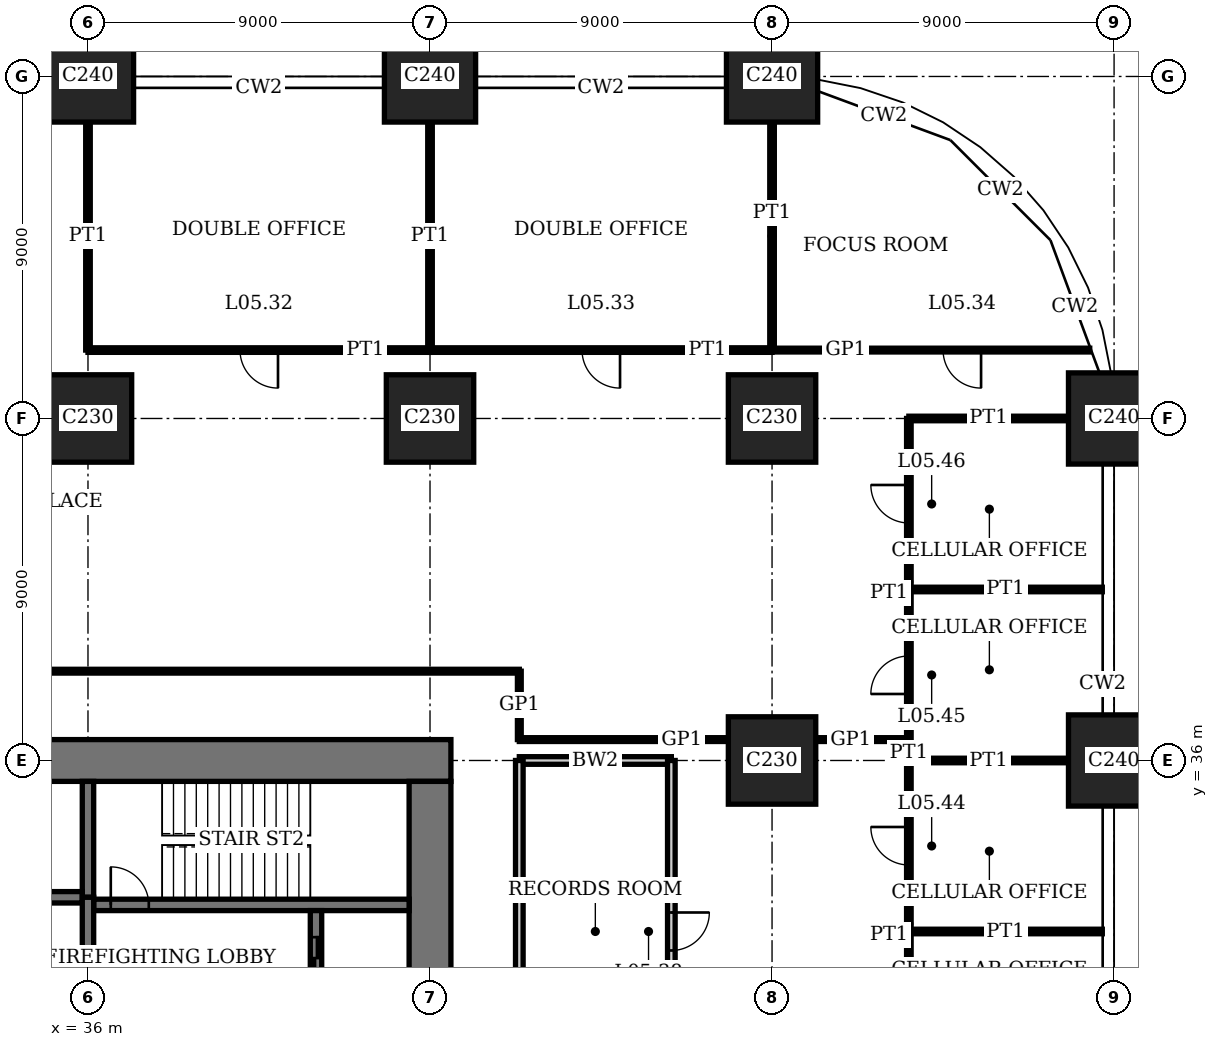
"""IFC4 building model, lengths in metres.
Left out: names, types, materials, properties, quantities, classifications, styles, units other than length and angle.
Written with IfcOpenShell. Run it as: python <this file> out.ifc"""

import sys

from ifc_helpers import new_model, si_unit, direction, frame, frame_2d, origin, origin_2d, place, context, subcontext, project, spatial, rectangle, extrude, element, fill, save


model = new_model("IFC4")
c1 = context("Model", 3, precision=1e-05, world=origin(), true_north=direction((0.0, 1.0)))
c2 = subcontext(c1, "Body", "Model", "MODEL_VIEW")
j1 = project(units=[si_unit("LENGTHUNIT", "METRE"), si_unit("PLANEANGLEUNIT", "RADIAN")], contexts=[c1])
p1 = place(None, origin())
s1 = spatial("IfcSite", under=j1, at=p1, CompositionType="ELEMENT")
p2 = place(p1, origin())
s2 = spatial("IfcBuilding", under=s1, at=p2, CompositionType="ELEMENT")
p3 = place(p2, frame((0.0, 0.0, 23.8)))
s3 = spatial("IfcBuildingStorey", under=s2, at=p3, CompositionType="ELEMENT", Elevation=23.8)
p4 = place(p3, frame((36.0, 45.0, 0.0), z_axis=(0.0, 0.0, 1.0), x_axis=(1.0, 0.0, 0.0)))
e1 = element("IfcColumn", 1, at=p4, inside=s3, PredefinedType="COLUMN", context=c2, shape_type="SweptSolid", body=[
    extrude(rectangle(XDim=2.3, YDim=2.3, at=origin_2d()), origin(), (0.0, 0.0, 1.0), 4.0),
])
p5 = place(p3, frame((36.0, 54.0, 0.0), z_axis=(0.0, 0.0, 1.0), x_axis=(1.0, 0.0, 0.0)))
e2 = element("IfcColumn", 2, at=p5, inside=s3, PredefinedType="COLUMN", context=c2, shape_type="SweptSolid", body=[
    extrude(rectangle(XDim=2.4, YDim=2.4, at=origin_2d()), origin(), (0.0, 0.0, 1.0), 4.0),
])
p6 = place(p3, frame((45.0, 45.0, 0.0), z_axis=(0.0, 0.0, 1.0), x_axis=(1.0, 0.0, 0.0)))
e3 = element("IfcColumn", 3, at=p6, inside=s3, PredefinedType="COLUMN", context=c2, shape_type="SweptSolid", body=[
    extrude(rectangle(XDim=2.3, YDim=2.3, at=origin_2d()), origin(), (0.0, 0.0, 1.0), 4.0),
])
p7 = place(p3, frame((45.0, 54.0, 0.0), z_axis=(0.0, 0.0, 1.0), x_axis=(1.0, 0.0, 0.0)))
e4 = element("IfcColumn", 4, at=p7, inside=s3, PredefinedType="COLUMN", context=c2, shape_type="SweptSolid", body=[
    extrude(rectangle(XDim=2.4, YDim=2.4, at=origin_2d()), origin(), (0.0, 0.0, 1.0), 4.0),
])
for number, where, z_axis, x_axis in (
    (5, (54.0, 36.0, 0.0), (0.0, 0.0, 1.0), (1.0, 0.0, 0.0)),
    (6, (54.0, 45.0, 0.0), (0.0, 0.0, 1.0), (1.0, 0.0, 0.0)),
):
    element("IfcColumn", number, at=place(p3, frame(where, z_axis=z_axis, x_axis=x_axis)), inside=s3, PredefinedType="COLUMN", context=c2, shape_type="SweptSolid", body=[
        extrude(rectangle(XDim=2.3, YDim=2.3, at=origin_2d()), origin(), (0.0, 0.0, 1.0), 4.0),
    ])
for number, where, z_axis, x_axis in (
    (7, (54.0, 54.0, 0.0), (0.0, 0.0, 1.0), (1.0, 0.0, 0.0)),
    (8, (63.0, 36.0, 0.0), (0.0, 0.0, 1.0), (1.0, 0.0, 0.0)),
    (9, (63.0, 45.0, 0.0), (0.0, 0.0, 1.0), (1.0, 0.0, 0.0)),
):
    element("IfcColumn", number, at=place(p3, frame(where, z_axis=z_axis, x_axis=x_axis)), inside=s3, PredefinedType="COLUMN", context=c2, shape_type="SweptSolid", body=[
        extrude(rectangle(XDim=2.4, YDim=2.4, at=origin_2d()), origin(), (0.0, 0.0, 1.0), 4.0),
    ])
p8 = place(p3, frame((45.55, 36.0, 0.0), z_axis=(0.0, 0.0, 1.0), x_axis=(-1.0, 0.0, 0.0)))
e10 = element("IfcWall", 10, at=p8, inside=s3, PredefinedType="SHEAR", context=c2, shape_type="SweptSolid", body=[
    extrude(rectangle(XDim=28.1, YDim=1.1, at=frame_2d((14.05, 0.0))), origin(), (0.0, 0.0, 1.0), 4.0),
])
p9 = place(p8, frame((11.55, 0.0, 0.0)))
e11 = element("IfcOpeningElement", 11, at=p9, cuts=e10, PredefinedType="OPENING", context=c2, shape_type="SweptSolid", body=[
    extrude(rectangle(XDim=1.0, YDim=2.4, at=frame_2d((0.5, 1.2))), frame((0.0, 0.56, 0.0), z_axis=(0.0, -1.0, 0.0), x_axis=(1.0, 0.0, 0.0)), (0.0, 0.0, 1.0), 1.12),
])
p10 = place(p8, frame((16.55, 0.0, 0.0)))
e12 = element("IfcOpeningElement", 12, at=p10, cuts=e10, PredefinedType="OPENING", context=c2, shape_type="SweptSolid", body=[
    extrude(rectangle(XDim=1.0, YDim=2.4, at=frame_2d((0.5, 1.2))), frame((0.0, 0.56, 0.0), z_axis=(0.0, -1.0, 0.0), x_axis=(1.0, 0.0, 0.0)), (0.0, 0.0, 1.0), 1.12),
])
p11 = place(p8, frame((20.0, 0.0, 0.0)))
e13 = element("IfcOpeningElement", 13, at=p11, cuts=e10, PredefinedType="OPENING", context=c2, shape_type="SweptSolid", body=[
    extrude(rectangle(XDim=1.1, YDim=2.4, at=frame_2d((0.55, 1.2))), frame((0.0, 0.56, 0.0), z_axis=(0.0, -1.0, 0.0), x_axis=(1.0, 0.0, 0.0)), (0.0, 0.0, 1.0), 1.12),
])
p12 = place(p8, frame((24.05, 0.0, 0.0)))
e14 = element("IfcOpeningElement", 14, at=p12, cuts=e10, PredefinedType="OPENING", context=c2, shape_type="SweptSolid", body=[
    extrude(rectangle(XDim=1.0, YDim=2.4, at=frame_2d((0.5, 1.2))), frame((0.0, 0.56, 0.0), z_axis=(0.0, -1.0, 0.0), x_axis=(1.0, 0.0, 0.0)), (0.0, 0.0, 1.0), 1.12),
])
p13 = place(p3, frame((45.0, 18.55, 0.0), z_axis=(0.0, 0.0, 1.0), x_axis=(0.0, 1.0, 0.0)))
e15 = element("IfcWall", 15, at=p13, inside=s3, PredefinedType="SHEAR", context=c2, shape_type="SweptSolid", body=[
    extrude(rectangle(XDim=16.9, YDim=1.1, at=frame_2d((8.45, 0.0))), origin(), (0.0, 0.0, 1.0), 4.0),
])
p14 = place(p13, frame((8.45, 0.0, 0.0)))
e16 = element("IfcOpeningElement", 16, at=p14, cuts=e15, PredefinedType="OPENING", context=c2, shape_type="SweptSolid", body=[
    extrude(rectangle(XDim=1.8, YDim=2.4, at=frame_2d((0.9, 1.2))), frame((0.0, 0.56, 0.0), z_axis=(0.0, -1.0, 0.0), x_axis=(1.0, 0.0, 0.0)), (0.0, 0.0, 1.0), 1.12),
])
p15 = place(p3, frame((36.15, 32.2, 0.0), z_axis=(0.0, 0.0, 1.0), x_axis=(1.0, 0.0, 0.0)))
e17 = element("IfcWall", 17, at=p15, inside=s3, PredefinedType="SHEAR", context=c2, shape_type="SweptSolid", body=[
    extrude(rectangle(XDim=8.3, YDim=0.3, at=frame_2d((4.15, 0.0))), origin(), (0.0, 0.0, 1.0), 4.0),
])
p16 = place(p15, frame((0.45, 0.0, 0.0)))
e18 = element("IfcOpeningElement", 18, at=p16, cuts=e17, PredefinedType="OPENING", context=c2, shape_type="SweptSolid", body=[
    extrude(rectangle(XDim=1.0, YDim=2.4, at=frame_2d((0.5, 1.2))), frame((0.0, 0.16, 0.0), z_axis=(0.0, -1.0, 0.0), x_axis=(1.0, 0.0, 0.0)), (0.0, 0.0, 1.0), 0.32),
])
p17 = place(p3, frame((36.0, 32.4, 0.0), z_axis=(0.0, 0.0, 1.0), x_axis=(0.0, 1.0, 0.0)))
e19 = element("IfcWall", 19, at=p17, inside=s3, PredefinedType="SHEAR", context=c2, shape_type="SweptSolid", body=[
    extrude(rectangle(XDim=3.05, YDim=0.3, at=frame_2d((1.525, 0.0))), origin(), (0.0, 0.0, 1.0), 4.0),
])
p18 = place(p3, frame((42.0, 29.55, 0.0), z_axis=(0.0, 0.0, 1.0), x_axis=(0.0, 1.0, 0.0)))
e20 = element("IfcWall", 20, at=p18, inside=s3, PredefinedType="SHEAR", context=c2, shape_type="SweptSolid", body=[
    extrude(rectangle(XDim=2.5, YDim=0.3, at=frame_2d((1.25, 0.0))), origin(), (0.0, 0.0, 1.0), 4.0),
])
p19 = place(p18, frame((0.7, 0.0, 0.0)))
e21 = element("IfcOpeningElement", 21, at=p19, cuts=e20, PredefinedType="OPENING", context=c2, shape_type="SweptSolid", body=[
    extrude(rectangle(XDim=1.1, YDim=2.4, at=frame_2d((0.55, 1.2))), frame((0.0, 0.16, 0.0), z_axis=(0.0, -1.0, 0.0), x_axis=(1.0, 0.0, 0.0)), (0.0, 0.0, 1.0), 0.32),
])
p20 = place(p3, frame((18.55, 32.4, 0.0), z_axis=(0.0, 0.0, 1.0), x_axis=(1.0, 0.0, 0.0)))
e22 = element("IfcWall", 22, at=p20, inside=s3, PredefinedType="SHEAR", context=c2, shape_type="SweptSolid", body=[
    extrude(rectangle(XDim=17.3, YDim=0.3, at=frame_2d((8.65, 0.0))), origin(), (0.0, 0.0, 1.0), 4.0),
])
p21 = place(p3, frame((36.0, 29.55, 0.0), z_axis=(0.0, 0.0, 1.0), x_axis=(0.0, 1.0, 0.0)))
e23 = element("IfcWall", 23, at=p21, inside=s3, PredefinedType="SHEAR", context=c2, shape_type="SweptSolid", body=[
    extrude(rectangle(XDim=2.85, YDim=0.3, at=frame_2d((1.425, 0.0))), origin(), (0.0, 0.0, 1.0), 4.0),
])
p22 = place(p3, frame((57.6, 31.5, 0.0), z_axis=(0.0, 0.0, 1.0), x_axis=(1.0, 0.0, 0.0)))
e24 = element("IfcWall", 24, at=p22, inside=s3, PredefinedType="PARTITIONING", context=c2, shape_type="SweptSolid", body=[
    extrude(rectangle(XDim=5.09, YDim=0.12, at=frame_2d((2.545, 0.0))), origin(), (0.0, 0.0, 1.0), 3.1),
])
p23 = place(p3, frame((47.35, 36.0, 0.0), z_axis=(0.0, 0.0, 1.0), x_axis=(1.0, 0.0, 0.0)))
e25 = element("IfcWall", 25, at=p23, inside=s3, PredefinedType="SOLIDWALL", context=c2, shape_type="SweptSolid", body=[
    extrude(rectangle(XDim=4.0, YDim=0.2, at=frame_2d((2.0, 0.0))), origin(), (0.0, 0.0, 1.0), 3.05),
])
p24 = place(p3, frame((57.6, 36.0, 0.0), z_axis=(0.0, 0.0, 1.0), x_axis=(1.0, 0.0, 0.0)))
e26 = element("IfcWall", 26, at=p24, inside=s3, PredefinedType="PARTITIONING", context=c2, shape_type="SweptSolid", body=[
    extrude(rectangle(XDim=4.2, YDim=0.12, at=frame_2d((2.1, 0.0))), origin(), (0.0, 0.0, 1.0), 3.05),
])
p25 = place(p3, frame((47.35, 36.55, 0.0), z_axis=(0.0, 0.0, 1.0), x_axis=(1.0, 0.0, 0.0)))
e27 = element("IfcWall", 27, at=p25, inside=s3, PredefinedType="PARTITIONING", context=c2, shape_type="SweptSolid", body=[
    extrude(rectangle(XDim=5.5, YDim=0.1, at=frame_2d((2.75, 0.0))), origin(), (0.0, 0.0, 1.0), 3.75),
])
p26 = place(p3, frame((55.15, 36.55, 0.0), z_axis=(0.0, 0.0, 1.0), x_axis=(1.0, 0.0, 0.0)))
e28 = element("IfcWall", 28, at=p26, inside=s3, PredefinedType="PARTITIONING", context=c2, shape_type="SweptSolid", body=[
    extrude(rectangle(XDim=2.46, YDim=0.1, at=frame_2d((1.23, 0.0))), origin(), (0.0, 0.0, 1.0), 3.75),
])
p27 = place(p3, frame((15.65, 38.35, 0.0), z_axis=(0.0, 0.0, 1.0), x_axis=(1.0, 0.0, 0.0)))
e29 = element("IfcWall", 29, at=p27, inside=s3, PredefinedType="PARTITIONING", context=c2, shape_type="SweptSolid", body=[
    extrude(rectangle(XDim=31.7, YDim=0.1, at=frame_2d((15.85, 0.0))), origin(), (0.0, 0.0, 1.0), 3.75),
])
p28 = place(p27, frame((15.35, 0.0, 0.0)))
e30 = element("IfcOpeningElement", 30, at=p28, cuts=e29, PredefinedType="OPENING", context=c2, shape_type="SweptSolid", body=[
    extrude(rectangle(XDim=1.0, YDim=2.4, at=frame_2d((0.5, 1.2))), frame((0.0, 0.06, 0.0), z_axis=(0.0, -1.0, 0.0), x_axis=(1.0, 0.0, 0.0)), (0.0, 0.0, 1.0), 0.12),
])
p29 = place(p3, frame((57.6, 40.5, 0.0), z_axis=(0.0, 0.0, 1.0), x_axis=(1.0, 0.0, 0.0)))
e31 = element("IfcWall", 31, at=p29, inside=s3, PredefinedType="PARTITIONING", context=c2, shape_type="SweptSolid", body=[
    extrude(rectangle(XDim=5.09, YDim=0.12, at=frame_2d((2.545, 0.0))), origin(), (0.0, 0.0, 1.0), 3.1),
])
p30 = place(p3, frame((57.6, 45.0, 0.0), z_axis=(0.0, 0.0, 1.0), x_axis=(1.0, 0.0, 0.0)))
e32 = element("IfcWall", 32, at=p30, inside=s3, PredefinedType="PARTITIONING", context=c2, shape_type="SweptSolid", body=[
    extrude(rectangle(XDim=4.2, YDim=0.12, at=frame_2d((2.1, 0.0))), origin(), (0.0, 0.0, 1.0), 3.05),
])
p31 = place(p3, frame((36.0, 46.8, 0.0), z_axis=(0.0, 0.0, 1.0), x_axis=(1.0, 0.0, 0.0)))
e33 = element("IfcWall", 33, at=p31, inside=s3, PredefinedType="PARTITIONING", context=c2, shape_type="SweptSolid", body=[
    extrude(rectangle(XDim=9.0, YDim=0.12, at=frame_2d((4.5, 0.0))), origin(), (0.0, 0.0, 1.0), 3.75),
])
p32 = place(p31, frame((4.0, 0.0, 0.0)))
e34 = element("IfcOpeningElement", 34, at=p32, cuts=e33, PredefinedType="OPENING", context=c2, shape_type="SweptSolid", body=[
    extrude(rectangle(XDim=1.0, YDim=2.4, at=frame_2d((0.5, 1.2))), frame((0.0, 0.07, 0.0), z_axis=(0.0, -1.0, 0.0), x_axis=(1.0, 0.0, 0.0)), (0.0, 0.0, 1.0), 0.14),
])
p33 = place(p3, frame((45.0, 46.8, 0.0), z_axis=(0.0, 0.0, 1.0), x_axis=(1.0, 0.0, 0.0)))
e35 = element("IfcWall", 35, at=p33, inside=s3, PredefinedType="PARTITIONING", context=c2, shape_type="SweptSolid", body=[
    extrude(rectangle(XDim=9.0, YDim=0.12, at=frame_2d((4.5, 0.0))), origin(), (0.0, 0.0, 1.0), 3.75),
])
p34 = place(p33, frame((4.0, 0.0, 0.0)))
e36 = element("IfcOpeningElement", 36, at=p34, cuts=e35, PredefinedType="OPENING", context=c2, shape_type="SweptSolid", body=[
    extrude(rectangle(XDim=1.0, YDim=2.4, at=frame_2d((0.5, 1.2))), frame((0.0, 0.07, 0.0), z_axis=(0.0, -1.0, 0.0), x_axis=(1.0, 0.0, 0.0)), (0.0, 0.0, 1.0), 0.14),
])
p35 = place(p3, frame((54.0, 46.8, 0.0), z_axis=(0.0, 0.0, 1.0), x_axis=(1.0, 0.0, 0.0)))
e37 = element("IfcWall", 37, at=p35, inside=s3, PredefinedType="PARTITIONING", context=c2, shape_type="SweptSolid", body=[
    extrude(rectangle(XDim=8.359, YDim=0.1, at=frame_2d((4.18, 0.0))), origin(), (0.0, 0.0, 1.0), 3.75),
])
p36 = place(p35, frame((4.5, 0.0, 0.0)))
e38 = element("IfcOpeningElement", 38, at=p36, cuts=e37, PredefinedType="OPENING", context=c2, shape_type="SweptSolid", body=[
    extrude(rectangle(XDim=1.0, YDim=2.4, at=frame_2d((0.5, 1.2))), frame((0.0, 0.06, 0.0), z_axis=(0.0, -1.0, 0.0), x_axis=(1.0, 0.0, 0.0)), (0.0, 0.0, 1.0), 0.12),
])
for number, where, z_axis, x_axis in (
    (39, (36.0, 46.8, 0.0), (0.0, 0.0, 1.0), (0.0, 1.0, 0.0)),
    (40, (45.0, 46.8, 0.0), (0.0, 0.0, 1.0), (0.0, 1.0, 0.0)),
):
    element("IfcWall", number, at=place(p3, frame(where, z_axis=z_axis, x_axis=x_axis)), inside=s3, PredefinedType="PARTITIONING", context=c2, shape_type="SweptSolid", body=[
        extrude(rectangle(XDim=6.0, YDim=0.12, at=frame_2d((3.0, 0.0))), origin(), (0.0, 0.0, 1.0), 3.05),
    ])
p37 = place(p3, frame((47.35, 27.0, 0.0), z_axis=(0.0, 0.0, 1.0), x_axis=(0.0, 1.0, 0.0)))
e41 = element("IfcWall", 41, at=p37, inside=s3, PredefinedType="SOLIDWALL", context=c2, shape_type="SweptSolid", body=[
    extrude(rectangle(XDim=9.0, YDim=0.2, at=frame_2d((4.5, 0.0))), origin(), (0.0, 0.0, 1.0), 3.75),
])
p38 = place(p3, frame((47.35, 36.55, 0.0), z_axis=(0.0, 0.0, 1.0), x_axis=(0.0, 1.0, 0.0)))
e42 = element("IfcWall", 42, at=p38, inside=s3, PredefinedType="PARTITIONING", context=c2, shape_type="SweptSolid", body=[
    extrude(rectangle(XDim=1.8, YDim=0.1, at=frame_2d((0.9, 0.0))), origin(), (0.0, 0.0, 1.0), 3.75),
])
p39 = place(p3, frame((51.35, 27.0, 0.0), z_axis=(0.0, 0.0, 1.0), x_axis=(0.0, 1.0, 0.0)))
e43 = element("IfcWall", 43, at=p39, inside=s3, PredefinedType="SOLIDWALL", context=c2, shape_type="SweptSolid", body=[
    extrude(rectangle(XDim=9.0, YDim=0.2, at=frame_2d((4.5, 0.0))), origin(), (0.0, 0.0, 1.0), 3.75),
])
p40 = place(p39, frame((4.0, 0.0, 0.0)))
e44 = element("IfcOpeningElement", 44, at=p40, cuts=e43, PredefinedType="OPENING", context=c2, shape_type="SweptSolid", body=[
    extrude(rectangle(XDim=1.0, YDim=2.4, at=frame_2d((0.5, 1.2))), frame((0.0, 0.11, 0.0), z_axis=(0.0, -1.0, 0.0), x_axis=(1.0, 0.0, 0.0)), (0.0, 0.0, 1.0), 0.22),
])
p41 = place(p3, frame((54.0, 46.8, 0.0), z_axis=(0.0, 0.0, 1.0), x_axis=(0.0, 1.0, 0.0)))
e45 = element("IfcWall", 45, at=p41, inside=s3, PredefinedType="PARTITIONING", context=c2, shape_type="SweptSolid", body=[
    extrude(rectangle(XDim=6.0, YDim=0.12, at=frame_2d((3.0, 0.0))), origin(), (0.0, 0.0, 1.0), 3.05),
])
p42 = place(p3, frame((57.6, 27.0, 0.0), z_axis=(0.0, 0.0, 1.0), x_axis=(0.0, 1.0, 0.0)))
e46 = element("IfcWall", 46, at=p42, inside=s3, PredefinedType="PARTITIONING", context=c2, shape_type="SweptSolid", body=[
    extrude(rectangle(XDim=4.5, YDim=0.12, at=frame_2d((2.25, 0.0))), origin(), (0.0, 0.0, 1.0), 3.75),
])
p43 = place(p42, frame((1.75, 0.0, 0.0)))
e47 = element("IfcOpeningElement", 47, at=p43, cuts=e46, PredefinedType="OPENING", context=c2, shape_type="SweptSolid", body=[
    extrude(rectangle(XDim=1.0, YDim=2.4, at=frame_2d((0.5, 1.2))), frame((0.0, 0.07, 0.0), z_axis=(0.0, -1.0, 0.0), x_axis=(1.0, 0.0, 0.0)), (0.0, 0.0, 1.0), 0.14),
])
p44 = place(p3, frame((57.6, 31.5, 0.0), z_axis=(0.0, 0.0, 1.0), x_axis=(0.0, 1.0, 0.0)))
e48 = element("IfcWall", 48, at=p44, inside=s3, PredefinedType="PARTITIONING", context=c2, shape_type="SweptSolid", body=[
    extrude(rectangle(XDim=4.5, YDim=0.12, at=frame_2d((2.25, 0.0))), origin(), (0.0, 0.0, 1.0), 3.75),
])
p45 = place(p44, frame((1.75, 0.0, 0.0)))
e49 = element("IfcOpeningElement", 49, at=p45, cuts=e48, PredefinedType="OPENING", context=c2, shape_type="SweptSolid", body=[
    extrude(rectangle(XDim=1.0, YDim=2.4, at=frame_2d((0.5, 1.2))), frame((0.0, 0.07, 0.0), z_axis=(0.0, -1.0, 0.0), x_axis=(1.0, 0.0, 0.0)), (0.0, 0.0, 1.0), 0.14),
])
p46 = place(p3, frame((57.6, 36.0, 0.0), z_axis=(0.0, 0.0, 1.0), x_axis=(0.0, 1.0, 0.0)))
e50 = element("IfcWall", 50, at=p46, inside=s3, PredefinedType="PARTITIONING", context=c2, shape_type="SweptSolid", body=[
    extrude(rectangle(XDim=4.5, YDim=0.12, at=frame_2d((2.25, 0.0))), origin(), (0.0, 0.0, 1.0), 3.75),
])
p47 = place(p46, frame((1.75, 0.0, 0.0)))
e51 = element("IfcOpeningElement", 51, at=p47, cuts=e50, PredefinedType="OPENING", context=c2, shape_type="SweptSolid", body=[
    extrude(rectangle(XDim=1.0, YDim=2.4, at=frame_2d((0.5, 1.2))), frame((0.0, 0.07, 0.0), z_axis=(0.0, -1.0, 0.0), x_axis=(1.0, 0.0, 0.0)), (0.0, 0.0, 1.0), 0.14),
])
p48 = place(p3, frame((57.6, 40.5, 0.0), z_axis=(0.0, 0.0, 1.0), x_axis=(0.0, 1.0, 0.0)))
e52 = element("IfcWall", 52, at=p48, inside=s3, PredefinedType="PARTITIONING", context=c2, shape_type="SweptSolid", body=[
    extrude(rectangle(XDim=4.5, YDim=0.12, at=frame_2d((2.25, 0.0))), origin(), (0.0, 0.0, 1.0), 3.75),
])
p49 = place(p48, frame((1.75, 0.0, 0.0)))
e53 = element("IfcOpeningElement", 53, at=p49, cuts=e52, PredefinedType="OPENING", context=c2, shape_type="SweptSolid", body=[
    extrude(rectangle(XDim=1.0, YDim=2.4, at=frame_2d((0.5, 1.2))), frame((0.0, 0.07, 0.0), z_axis=(0.0, -1.0, 0.0), x_axis=(1.0, 0.0, 0.0)), (0.0, 0.0, 1.0), 0.14),
])
p50 = place(p16, origin())
e54 = element("IfcDoor", 54, at=p50, inside=s3, OperationType="SINGLE_SWING_RIGHT", PredefinedType="DOOR", context=c2, shape_type="SweptSolid", body=[
    extrude(rectangle(XDim=1.0, YDim=2.4, at=frame_2d((0.5, 1.2))), frame((0.0, 0.03, 0.0), z_axis=(0.0, -1.0, 0.0), x_axis=(1.0, 0.0, 0.0)), (0.0, 0.0, 1.0), 0.06),
])
fill(e18, e54)
p51 = place(p32, origin())
e55 = element("IfcDoor", 55, at=p51, inside=s3, OperationType="SINGLE_SWING_RIGHT", PredefinedType="DOOR", context=c2, shape_type="SweptSolid", body=[
    extrude(rectangle(XDim=1.0, YDim=2.4, at=frame_2d((0.5, 1.2))), frame((0.0, 0.025, 0.0), z_axis=(0.0, -1.0, 0.0), x_axis=(1.0, 0.0, 0.0)), (0.0, 0.0, 1.0), 0.05),
])
fill(e34, e55)
p52 = place(p34, origin())
e56 = element("IfcDoor", 56, at=p52, inside=s3, OperationType="SINGLE_SWING_RIGHT", PredefinedType="DOOR", context=c2, shape_type="SweptSolid", body=[
    extrude(rectangle(XDim=1.0, YDim=2.4, at=frame_2d((0.5, 1.2))), frame((0.0, 0.025, 0.0), z_axis=(0.0, -1.0, 0.0), x_axis=(1.0, 0.0, 0.0)), (0.0, 0.0, 1.0), 0.05),
])
fill(e36, e56)
p53 = place(p36, origin())
e57 = element("IfcDoor", 57, at=p53, inside=s3, OperationType="SINGLE_SWING_RIGHT", PredefinedType="DOOR", context=c2, shape_type="SweptSolid", body=[
    extrude(rectangle(XDim=1.0, YDim=2.4, at=frame_2d((0.5, 1.2))), frame((0.0, 0.02, 0.0), z_axis=(0.0, -1.0, 0.0), x_axis=(1.0, 0.0, 0.0)), (0.0, 0.0, 1.0), 0.04),
])
fill(e38, e57)
p54 = place(p40, origin())
e58 = element("IfcDoor", 58, at=p54, inside=s3, OperationType="SINGLE_SWING_RIGHT", PredefinedType="DOOR", context=c2, shape_type="SweptSolid", body=[
    extrude(rectangle(XDim=1.0, YDim=2.4, at=frame_2d((0.5, 1.2))), frame((0.0, 0.035, 0.0), z_axis=(0.0, -1.0, 0.0), x_axis=(1.0, 0.0, 0.0)), (0.0, 0.0, 1.0), 0.07),
])
fill(e44, e58)
p55 = place(p45, origin())
e59 = element("IfcDoor", 59, at=p55, inside=s3, OperationType="SINGLE_SWING_LEFT", PredefinedType="DOOR", context=c2, shape_type="SweptSolid", body=[
    extrude(rectangle(XDim=1.0, YDim=2.4, at=frame_2d((0.5, 1.2))), frame((0.0, 0.025, 0.0), z_axis=(0.0, -1.0, 0.0), x_axis=(1.0, 0.0, 0.0)), (0.0, 0.0, 1.0), 0.05),
])
fill(e49, e59)
p56 = place(p47, origin())
e60 = element("IfcDoor", 60, at=p56, inside=s3, OperationType="SINGLE_SWING_RIGHT", PredefinedType="DOOR", context=c2, shape_type="SweptSolid", body=[
    extrude(rectangle(XDim=1.0, YDim=2.4, at=frame_2d((0.5, 1.2))), frame((0.0, 0.025, 0.0), z_axis=(0.0, -1.0, 0.0), x_axis=(1.0, 0.0, 0.0)), (0.0, 0.0, 1.0), 0.05),
])
fill(e51, e60)
p57 = place(p49, origin())
e61 = element("IfcDoor", 61, at=p57, inside=s3, OperationType="SINGLE_SWING_LEFT", PredefinedType="DOOR", context=c2, shape_type="SweptSolid", body=[
    extrude(rectangle(XDim=1.0, YDim=2.4, at=frame_2d((0.5, 1.2))), frame((0.0, 0.025, 0.0), z_axis=(0.0, -1.0, 0.0), x_axis=(1.0, 0.0, 0.0)), (0.0, 0.0, 1.0), 0.05),
])
fill(e53, e61)
p58 = place(p19, origin())
e62 = element("IfcDoor", 62, at=p58, inside=s3, OperationType="DOUBLE_DOOR_SLIDING", PredefinedType="DOOR", context=c2, shape_type="SweptSolid", body=[
    extrude(rectangle(XDim=1.1, YDim=2.4, at=frame_2d((0.55, 1.2))), frame((0.0, 0.03, 0.0), z_axis=(0.0, -1.0, 0.0), x_axis=(1.0, 0.0, 0.0)), (0.0, 0.0, 1.0), 0.06),
])
fill(e21, e62)
save(model, sys.argv[1])
